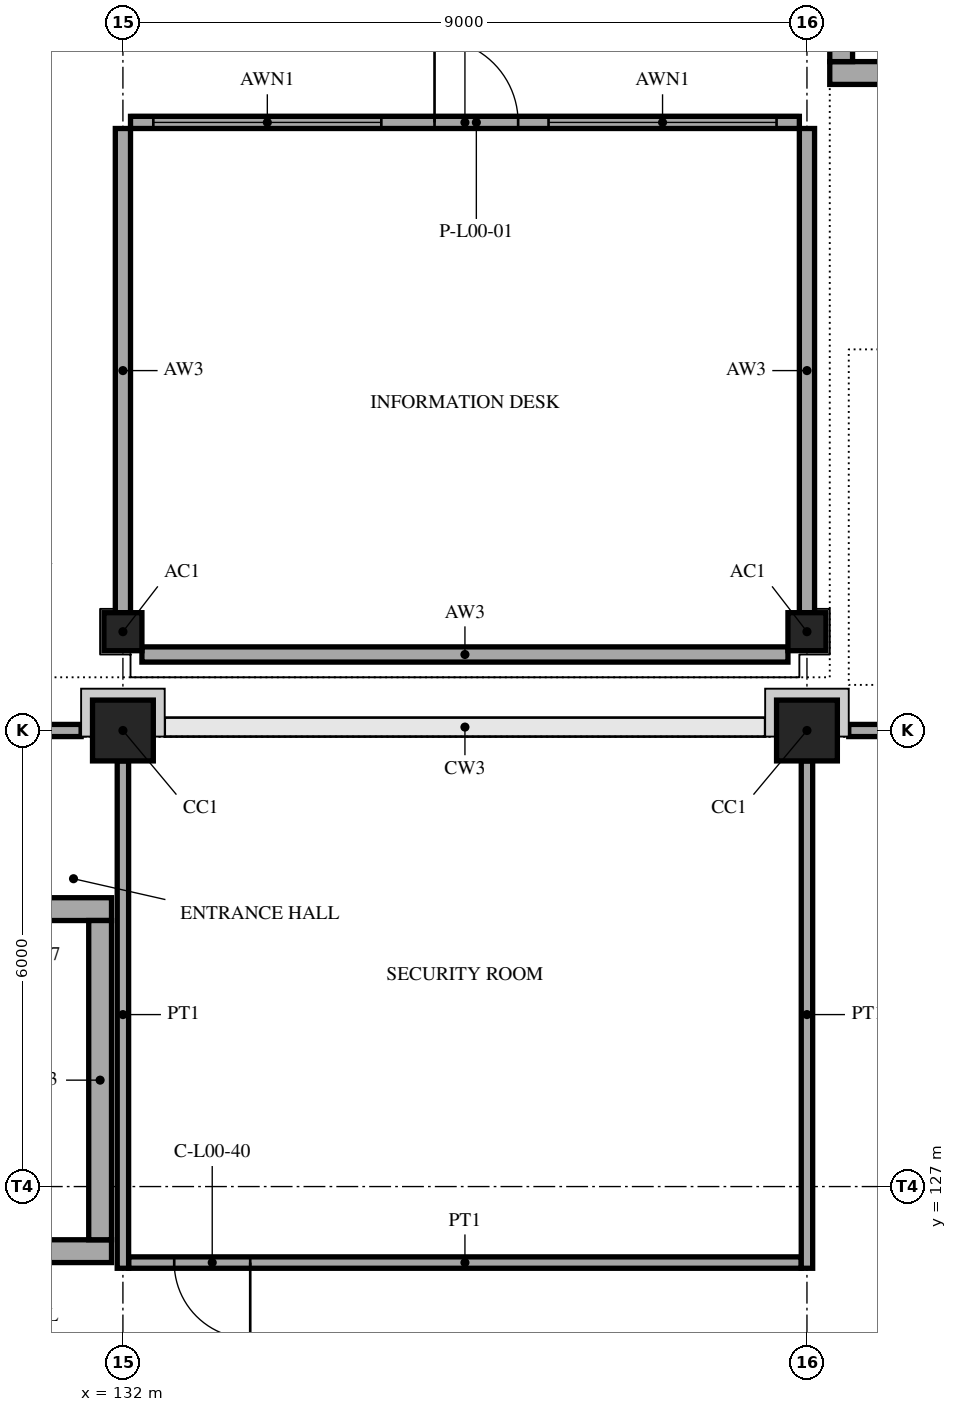
"""IFC4 building model, lengths in metres.
Left out: names, types, materials, properties, quantities, classifications, styles, units other than length and angle.
Written with IfcOpenShell. Run it as: python <this file> out.ifc"""

import sys

from ifc_helpers import new_model, si_unit, direction, frame, frame_2d, origin, origin_2d, place, context, subcontext, project, spatial, rectangle, extrude, element, fill, save


model = new_model("IFC4")
c1 = context("Model", 3, precision=1e-05, world=origin(), true_north=direction((0.0, 1.0)))
c2 = subcontext(c1, "Body", "Model", "MODEL_VIEW")
j1 = project(units=[si_unit("LENGTHUNIT", "METRE"), si_unit("PLANEANGLEUNIT", "RADIAN")], contexts=[c1])
p1 = place(None, origin())
s1 = spatial("IfcSite", under=j1, at=p1, CompositionType="ELEMENT")
p2 = place(p1, origin())
s2 = spatial("IfcBuilding", under=s1, at=p2, CompositionType="ELEMENT")
p3 = place(p2, origin())
s3 = spatial("IfcBuildingStorey", under=s2, at=p3, CompositionType="ELEMENT", Elevation=0.0)
for number, where, z_axis, x_axis in (
    (1, (132.0, 133.0, 0.0), (0.0, 0.0, 1.0), (1.0, 0.0, 0.0)),
    (2, (141.0, 133.0, 0.0), (0.0, 0.0, 1.0), (1.0, 0.0, 0.0)),
):
    element("IfcColumn", number, at=place(p3, frame(where, z_axis=z_axis, x_axis=x_axis)), inside=s3, PredefinedType="COLUMN", context=c2, shape_type="SweptSolid", body=[
        extrude(rectangle(XDim=0.8, YDim=0.8, at=origin_2d()), origin(), (0.0, 0.0, 1.0), 5.0),
    ])
p4 = place(p3, frame((123.15, 126.15, 0.0), z_axis=(0.0, 0.0, 1.0), x_axis=(1.0, 0.0, 0.0)))
e3 = element("IfcWall", 3, at=p4, inside=s3, PredefinedType="SHEAR", context=c2, shape_type="SweptSolid", body=[
    extrude(rectangle(XDim=8.7, YDim=0.3, at=frame_2d((4.35, 0.0))), origin(), (0.0, 0.0, 1.0), 5.0),
])
p5 = place(p4, frame((0.35, 0.0, 0.0)))
e4 = element("IfcOpeningElement", 4, at=p5, cuts=e3, PredefinedType="OPENING", context=c2, shape_type="SweptSolid", body=[
    extrude(rectangle(XDim=1.9, YDim=2.1, at=frame_2d((0.95, 1.05))), frame((0.0, 0.16, 0.0), z_axis=(0.0, -1.0, 0.0), x_axis=(1.0, 0.0, 0.0)), (0.0, 0.0, 1.0), 0.32),
])
p6 = place(p3, frame((123.15, 130.65, 0.0), z_axis=(0.0, 0.0, 1.0), x_axis=(1.0, 0.0, 0.0)))
e5 = element("IfcWall", 5, at=p6, inside=s3, PredefinedType="SHEAR", context=c2, shape_type="SweptSolid", body=[
    extrude(rectangle(XDim=8.7, YDim=0.3, at=frame_2d((4.35, 0.0))), origin(), (0.0, 0.0, 1.0), 5.0),
])
p7 = place(p6, frame((0.35, 0.0, 0.0)))
e6 = element("IfcOpeningElement", 6, at=p7, cuts=e5, PredefinedType="OPENING", context=c2, shape_type="SweptSolid", body=[
    extrude(rectangle(XDim=1.9, YDim=2.1, at=frame_2d((0.95, 1.05))), frame((0.0, 0.16, 0.0), z_axis=(0.0, -1.0, 0.0), x_axis=(1.0, 0.0, 0.0)), (0.0, 0.0, 1.0), 0.32),
])
p8 = place(p3, frame((131.7, 126.3, 0.0), z_axis=(0.0, 0.0, 1.0), x_axis=(0.0, 1.0, 0.0)))
e7 = element("IfcWall", 7, at=p8, inside=s3, PredefinedType="SHEAR", context=c2, shape_type="SweptSolid", body=[
    extrude(rectangle(XDim=4.2, YDim=0.3, at=frame_2d((2.1, 0.0))), origin(), (0.0, 0.0, 1.0), 5.0),
])
p9 = place(p3, frame((123.55, 133.0, 0.0), z_axis=(0.0, 0.0, 1.0), x_axis=(1.0, 0.0, 0.0)))
e8 = element("IfcWall", 8, at=p9, inside=s3, PredefinedType="STANDARD", context=c2, shape_type="SweptSolid", body=[
    extrude(rectangle(XDim=7.9, YDim=0.16, at=frame_2d((3.95, 0.0))), origin(), (0.0, 0.0, 1.0), 5.0),
])
p10 = place(p9, frame((0.9, 0.0, 0.0)))
e9 = element("IfcOpeningElement", 9, at=p10, cuts=e8, PredefinedType="OPENING", context=c2, shape_type="SweptSolid", body=[
    extrude(rectangle(XDim=2.0, YDim=2.4, at=frame_2d((1.0, 1.2))), frame((0.0, 0.09, 0.0), z_axis=(0.0, -1.0, 0.0), x_axis=(1.0, 0.0, 0.0)), (0.0, 0.0, 1.0), 0.18),
])
p11 = place(p9, frame((0.9, 0.0, 2.6)))
e10 = element("IfcOpeningElement", 10, at=p11, cuts=e8, PredefinedType="OPENING", context=c2, shape_type="SweptSolid", body=[
    extrude(rectangle(XDim=2.0, YDim=2.1, at=frame_2d((1.0, 1.05))), frame((0.0, 0.09, 0.0), z_axis=(0.0, -1.0, 0.0), x_axis=(1.0, 0.0, 0.0)), (0.0, 0.0, 1.0), 0.18),
])
p12 = place(p9, frame((5.0, 0.0, 0.0)))
e11 = element("IfcOpeningElement", 11, at=p12, cuts=e8, PredefinedType="OPENING", context=c2, shape_type="SweptSolid", body=[
    extrude(rectangle(XDim=2.0, YDim=2.4, at=frame_2d((1.0, 1.2))), frame((0.0, 0.09, 0.0), z_axis=(0.0, -1.0, 0.0), x_axis=(1.0, 0.0, 0.0)), (0.0, 0.0, 1.0), 0.18),
])
p13 = place(p9, frame((5.0, 0.0, 2.6)))
e12 = element("IfcOpeningElement", 12, at=p13, cuts=e8, PredefinedType="OPENING", context=c2, shape_type="SweptSolid", body=[
    extrude(rectangle(XDim=2.0, YDim=2.1, at=frame_2d((1.0, 1.05))), frame((0.0, 0.09, 0.0), z_axis=(0.0, -1.0, 0.0), x_axis=(1.0, 0.0, 0.0)), (0.0, 0.0, 1.0), 0.18),
])
p14 = place(p9, frame((3.4, 0.0, 0.9)))
e13 = element("IfcOpeningElement", 13, at=p14, cuts=e8, PredefinedType="OPENING", context=c2, shape_type="SweptSolid", body=[
    extrude(rectangle(XDim=1.1, YDim=3.8, at=frame_2d((0.55, 1.9))), frame((0.0, 0.09, 0.0), z_axis=(0.0, -1.0, 0.0), x_axis=(1.0, 0.0, 0.0)), (0.0, 0.0, 1.0), 0.18),
])
p15 = place(p3, frame((141.55, 133.0, 0.0), z_axis=(0.0, 0.0, 1.0), x_axis=(1.0, 0.0, 0.0)))
e14 = element("IfcWall", 14, at=p15, inside=s3, PredefinedType="STANDARD", context=c2, shape_type="SweptSolid", body=[
    extrude(rectangle(XDim=7.9, YDim=0.16, at=frame_2d((3.95, 0.0))), origin(), (0.0, 0.0, 1.0), 5.0),
])
p16 = place(p15, frame((0.9, 0.0, 0.0)))
e15 = element("IfcOpeningElement", 15, at=p16, cuts=e14, PredefinedType="OPENING", context=c2, shape_type="SweptSolid", body=[
    extrude(rectangle(XDim=2.0, YDim=2.4, at=frame_2d((1.0, 1.2))), frame((0.0, 0.09, 0.0), z_axis=(0.0, -1.0, 0.0), x_axis=(1.0, 0.0, 0.0)), (0.0, 0.0, 1.0), 0.18),
])
p17 = place(p15, frame((0.9, 0.0, 2.6)))
e16 = element("IfcOpeningElement", 16, at=p17, cuts=e14, PredefinedType="OPENING", context=c2, shape_type="SweptSolid", body=[
    extrude(rectangle(XDim=2.0, YDim=2.1, at=frame_2d((1.0, 1.05))), frame((0.0, 0.09, 0.0), z_axis=(0.0, -1.0, 0.0), x_axis=(1.0, 0.0, 0.0)), (0.0, 0.0, 1.0), 0.18),
])
p18 = place(p15, frame((5.0, 0.0, 0.0)))
e17 = element("IfcOpeningElement", 17, at=p18, cuts=e14, PredefinedType="OPENING", context=c2, shape_type="SweptSolid", body=[
    extrude(rectangle(XDim=2.0, YDim=2.4, at=frame_2d((1.0, 1.2))), frame((0.0, 0.09, 0.0), z_axis=(0.0, -1.0, 0.0), x_axis=(1.0, 0.0, 0.0)), (0.0, 0.0, 1.0), 0.18),
])
p19 = place(p15, frame((5.0, 0.0, 2.6)))
e18 = element("IfcOpeningElement", 18, at=p19, cuts=e14, PredefinedType="OPENING", context=c2, shape_type="SweptSolid", body=[
    extrude(rectangle(XDim=2.0, YDim=2.1, at=frame_2d((1.0, 1.05))), frame((0.0, 0.09, 0.0), z_axis=(0.0, -1.0, 0.0), x_axis=(1.0, 0.0, 0.0)), (0.0, 0.0, 1.0), 0.18),
])
p20 = place(p15, frame((3.4, 0.0, 0.9)))
e19 = element("IfcOpeningElement", 19, at=p20, cuts=e14, PredefinedType="OPENING", context=c2, shape_type="SweptSolid", body=[
    extrude(rectangle(XDim=1.1, YDim=3.8, at=frame_2d((0.55, 1.9))), frame((0.0, 0.09, 0.0), z_axis=(0.0, -1.0, 0.0), x_axis=(1.0, 0.0, 0.0)), (0.0, 0.0, 1.0), 0.18),
])
for number, where, z_axis, x_axis in (
    (20, (132.0, 134.3, -0.2), (0.0, 0.0, 1.0), (1.0, 0.0, 0.0)),
    (21, (141.0, 134.3, -0.2), (0.0, 0.0, 1.0), (1.0, 0.0, 0.0)),
):
    element("IfcColumn", number, at=place(p3, frame(where, z_axis=z_axis, x_axis=x_axis)), inside=s3, PredefinedType="COLUMN", context=c2, shape_type="SweptSolid", body=[
        extrude(rectangle(XDim=0.5, YDim=0.5, at=origin_2d()), origin(), (0.0, 0.0, 1.0), 4.95),
    ])
p21 = place(p3, frame((141.3, 141.65, -0.4), z_axis=(0.0, 0.0, 1.0), x_axis=(1.0, 0.0, 0.0)))
e22 = element("IfcWall", 22, at=p21, inside=s3, PredefinedType="SHEAR", context=c2, shape_type="SweptSolid", body=[
    extrude(rectangle(XDim=7.9, YDim=0.3, at=frame_2d((3.95, 0.0))), origin(), (0.0, 0.0, 1.0), 5.4),
])
p22 = place(p3, frame((141.45, 141.8, -0.4), z_axis=(0.0, 0.0, 1.0), x_axis=(0.0, 1.0, 0.0)))
e23 = element("IfcWall", 23, at=p22, inside=s3, PredefinedType="SHEAR", context=c2, shape_type="SweptSolid", body=[
    extrude(rectangle(XDim=4.2, YDim=0.3, at=frame_2d((2.1, 0.0))), origin(), (0.0, 0.0, 1.0), 5.4),
])
p23 = place(p3, frame((132.25, 134.0, 0.0), z_axis=(0.0, 0.0, 1.0), x_axis=(1.0, 0.0, 0.0)))
e24 = element("IfcWall", 24, at=p23, inside=s3, PredefinedType="STANDARD", context=c2, shape_type="SweptSolid", body=[
    extrude(rectangle(XDim=8.5, YDim=0.2, at=frame_2d((4.25, 0.0))), origin(), (0.0, 0.0, 1.0), 4.05),
])
for number, where, z_axis, x_axis in (
    (25, (132.0, 134.55, 0.0), (0.0, 0.0, 1.0), (0.0, 1.0, 0.0)),
    (26, (141.0, 134.55, 0.0), (0.0, 0.0, 1.0), (0.0, 1.0, 0.0)),
):
    element("IfcWall", number, at=place(p3, frame(where, z_axis=z_axis, x_axis=x_axis)), inside=s3, PredefinedType="STANDARD", context=c2, shape_type="SweptSolid", body=[
        extrude(rectangle(XDim=6.37, YDim=0.2, at=frame_2d((3.185, 0.0))), origin(), (0.0, 0.0, 1.0), 3.75),
    ])
p24 = place(p3, frame((132.1, 141.0, 0.0), z_axis=(0.0, 0.0, 1.0), x_axis=(1.0, 0.0, 0.0)))
e27 = element("IfcWall", 27, at=p24, inside=s3, PredefinedType="STANDARD", context=c2, shape_type="SweptSolid", body=[
    extrude(rectangle(XDim=8.8, YDim=0.16, at=frame_2d((4.4, 0.0))), origin(), (0.0, 0.0, 1.0), 3.75),
])
p25 = place(p24, frame((4.0, 0.0, 0.0)))
e28 = element("IfcOpeningElement", 28, at=p25, cuts=e27, PredefinedType="OPENING", context=c2, shape_type="SweptSolid", body=[
    extrude(rectangle(XDim=1.1, YDim=2.1, at=frame_2d((0.55, 1.05))), frame((0.0, 0.09, 0.0), z_axis=(0.0, -1.0, 0.0), x_axis=(1.0, 0.0, 0.0)), (0.0, 0.0, 1.0), 0.18),
])
p26 = place(p24, frame((0.3, 0.0, 0.5)))
e29 = element("IfcOpeningElement", 29, at=p26, cuts=e27, PredefinedType="OPENING", context=c2, shape_type="SweptSolid", body=[
    extrude(rectangle(XDim=3.0, YDim=2.4, at=frame_2d((1.5, 1.2))), frame((0.0, 0.09, 0.0), z_axis=(0.0, -1.0, 0.0), x_axis=(1.0, 0.0, 0.0)), (0.0, 0.0, 1.0), 0.18),
])
p27 = place(p24, frame((5.5, 0.0, 0.5)))
e30 = element("IfcOpeningElement", 30, at=p27, cuts=e27, PredefinedType="OPENING", context=c2, shape_type="SweptSolid", body=[
    extrude(rectangle(XDim=3.0, YDim=2.4, at=frame_2d((1.5, 1.2))), frame((0.0, 0.09, 0.0), z_axis=(0.0, -1.0, 0.0), x_axis=(1.0, 0.0, 0.0)), (0.0, 0.0, 1.0), 0.18),
])
p28 = place(p3, frame((132.075, 126.0, 0.0), z_axis=(0.0, 0.0, 1.0), x_axis=(1.0, 0.0, 0.0)))
e31 = element("IfcWall", 31, at=p28, inside=s3, PredefinedType="PARTITIONING", context=c2, shape_type="SweptSolid", body=[
    extrude(rectangle(XDim=8.85, YDim=0.15, at=frame_2d((4.425, 0.0))), origin(), (0.0, 0.0, 1.0), 4.8),
])
p29 = place(p28, frame((0.6, 0.0, 0.0)))
e32 = element("IfcOpeningElement", 32, at=p29, cuts=e31, PredefinedType="OPENING", context=c2, shape_type="SweptSolid", body=[
    extrude(rectangle(XDim=1.0, YDim=2.1, at=frame_2d((0.5, 1.05))), frame((0.0, 0.085, 0.0), z_axis=(0.0, -1.0, 0.0), x_axis=(1.0, 0.0, 0.0)), (0.0, 0.0, 1.0), 0.17),
])
for number, where, z_axis, x_axis in (
    (33, (132.0, 125.925, 0.0), (0.0, 0.0, 1.0), (0.0, 1.0, 0.0)),
    (34, (141.0, 125.925, 0.0), (0.0, 0.0, 1.0), (0.0, 1.0, 0.0)),
):
    element("IfcWall", number, at=place(p3, frame(where, z_axis=z_axis, x_axis=x_axis)), inside=s3, PredefinedType="PARTITIONING", context=c2, shape_type="SweptSolid", body=[
        extrude(rectangle(XDim=6.675, YDim=0.15, at=frame_2d((3.337, 0.0))), origin(), (0.0, 0.0, 1.0), 4.0),
    ])
p30 = place(p25, origin())
e35 = element("IfcDoor", 35, at=p30, inside=s3, OperationType="SINGLE_SWING_LEFT", PredefinedType="NOTDEFINED", context=c2, shape_type="SweptSolid", body=[
    extrude(rectangle(XDim=1.1, YDim=2.1, at=frame_2d((0.55, 1.05))), frame((0.0, 0.025, 0.0), z_axis=(0.0, -1.0, 0.0), x_axis=(1.0, 0.0, 0.0)), (0.0, 0.0, 1.0), 0.05),
])
fill(e28, e35)
p31 = place(p26, origin())
e36 = element("IfcWindow", 36, at=p31, inside=s3, PartitioningType="SINGLE_PANEL", PredefinedType="WINDOW", context=c2, shape_type="SweptSolid", body=[
    extrude(rectangle(XDim=3.0, YDim=2.4, at=frame_2d((1.5, 1.2))), frame((0.0, 0.03, 0.0), z_axis=(0.0, -1.0, 0.0), x_axis=(1.0, 0.0, 0.0)), (0.0, 0.0, 1.0), 0.06),
])
fill(e29, e36)
p32 = place(p27, origin())
e37 = element("IfcWindow", 37, at=p32, inside=s3, PartitioningType="SINGLE_PANEL", PredefinedType="WINDOW", context=c2, shape_type="SweptSolid", body=[
    extrude(rectangle(XDim=3.0, YDim=2.4, at=frame_2d((1.5, 1.2))), frame((0.0, 0.03, 0.0), z_axis=(0.0, -1.0, 0.0), x_axis=(1.0, 0.0, 0.0)), (0.0, 0.0, 1.0), 0.06),
])
fill(e30, e37)
p33 = place(p29, frame((1.0, 0.0, 0.0), z_axis=(0.0, 0.0, 1.0), x_axis=(-1.0, 0.0, 0.0)))
e38 = element("IfcDoor", 38, at=p33, inside=s3, OperationType="SINGLE_SWING_LEFT", PredefinedType="NOTDEFINED", context=c2, shape_type="SweptSolid", body=[
    extrude(rectangle(XDim=1.0, YDim=2.1, at=frame_2d((0.5, 1.05))), frame((0.0, 0.025, 0.0), z_axis=(0.0, -1.0, 0.0), x_axis=(1.0, 0.0, 0.0)), (0.0, 0.0, 1.0), 0.05),
])
fill(e32, e38)
save(model, sys.argv[1])
